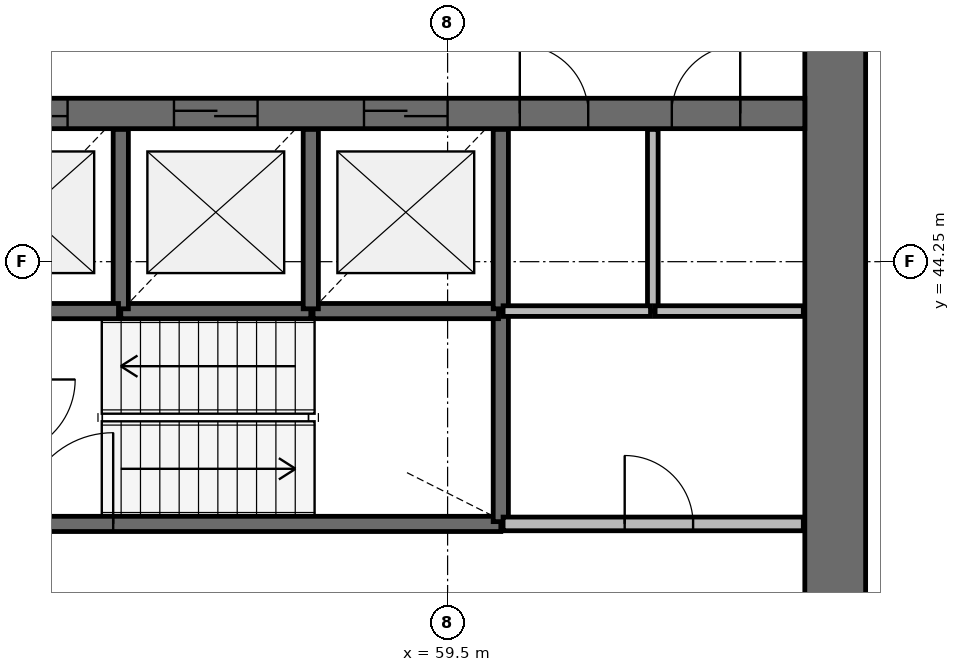
"""IFC4 building model, lengths in metres.
Left out: names, types, materials, properties, quantities, classifications, styles, units other than length and angle.
Written with IfcOpenShell. Run it as: python <this file> out.ifc"""

import sys

from ifc_helpers import new_model, si_unit, direction, frame, frame_2d, origin, place, context, subcontext, project, spatial, rectangle, extrude, source, transform, mapped, element, fill, save


model = new_model("IFC4")
c1 = context("Model", 3, precision=1e-05, world=origin(), true_north=direction((0.0, 1.0)))
c2 = subcontext(c1, "Body", "Model", "MODEL_VIEW")
j1 = project(units=[si_unit("LENGTHUNIT", "METRE"), si_unit("PLANEANGLEUNIT", "RADIAN")], contexts=[c1])
p1 = place(None, origin())
s1 = spatial("IfcSite", under=j1, at=p1, CompositionType="ELEMENT")
p2 = place(p1, origin())
s2 = spatial("IfcBuilding", under=s1, at=p2, CompositionType="ELEMENT")
p3 = place(p2, frame((0.0, 0.0, 133.1)))
s3 = spatial("IfcBuildingStorey", under=s2, at=p3, CompositionType="ELEMENT", Elevation=133.1)
p4 = place(p3, frame((64.6, 38.0, 0.0), z_axis=(0.0, 0.0, 1.0), x_axis=(0.0, 1.0, 0.0)))
e1 = element("IfcWall", 1, at=p4, inside=s3, PredefinedType="SHEAR", context=c2, shape_type="SweptSolid", body=[
    extrude(rectangle(XDim=20.0, YDim=0.8, at=frame_2d((10.0, 0.0))), origin(), (0.0, 0.0, 1.0), 3.9),
])
p5 = place(p4, frame((9.1, 0.0, 0.0)))
e2 = element("IfcOpeningElement", 2, at=p5, cuts=e1, PredefinedType="OPENING", context=c2, shape_type="SweptSolid", body=[
    extrude(rectangle(XDim=1.8, YDim=2.1, at=frame_2d((0.9, 1.05))), frame((0.0, 0.41, 0.0), z_axis=(0.0, -1.0, 0.0), x_axis=(1.0, 0.0, 0.0)), (0.0, 0.0, 1.0), 0.82),
])
p6 = place(p3, frame((39.8, 46.2, 0.0), z_axis=(0.0, 0.0, 1.0), x_axis=(1.0, 0.0, 0.0)))
e3 = element("IfcWall", 3, at=p6, inside=s3, PredefinedType="SHEAR", context=c2, shape_type="SweptSolid", body=[
    extrude(rectangle(XDim=24.4, YDim=0.4, at=frame_2d((12.2, 0.0))), origin(), (0.0, 0.0, 1.0), 3.9),
])
p7 = place(p6, frame((13.6, 0.0, 0.0)))
e4 = element("IfcOpeningElement", 4, at=p7, cuts=e3, PredefinedType="OPENING", context=c2, shape_type="SweptSolid", body=[
    extrude(rectangle(XDim=1.1, YDim=2.1, at=frame_2d((0.55, 1.05))), frame((0.0, 0.21, 0.0), z_axis=(0.0, -1.0, 0.0), x_axis=(1.0, 0.0, 0.0)), (0.0, 0.0, 1.0), 0.42),
])
p8 = place(p6, frame((16.1, 0.0, 0.0)))
e5 = element("IfcOpeningElement", 5, at=p8, cuts=e3, PredefinedType="OPENING", context=c2, shape_type="SweptSolid", body=[
    extrude(rectangle(XDim=1.1, YDim=2.1, at=frame_2d((0.55, 1.05))), frame((0.0, 0.21, 0.0), z_axis=(0.0, -1.0, 0.0), x_axis=(1.0, 0.0, 0.0)), (0.0, 0.0, 1.0), 0.42),
])
p9 = place(p6, frame((18.6, 0.0, 0.0)))
e6 = element("IfcOpeningElement", 6, at=p9, cuts=e3, PredefinedType="OPENING", context=c2, shape_type="SweptSolid", body=[
    extrude(rectangle(XDim=1.1, YDim=2.1, at=frame_2d((0.55, 1.05))), frame((0.0, 0.21, 0.0), z_axis=(0.0, -1.0, 0.0), x_axis=(1.0, 0.0, 0.0)), (0.0, 0.0, 1.0), 0.42),
])
p10 = place(p6, frame((4.7, 0.0, 0.0)))
e7 = element("IfcOpeningElement", 7, at=p10, cuts=e3, PredefinedType="OPENING", context=c2, shape_type="SweptSolid", body=[
    extrude(rectangle(XDim=1.1, YDim=2.1, at=frame_2d((0.55, 1.05))), frame((0.0, 0.21, 0.0), z_axis=(0.0, -1.0, 0.0), x_axis=(1.0, 0.0, 0.0)), (0.0, 0.0, 1.0), 0.42),
])
p11 = place(p6, frame((7.2, 0.0, 0.0)))
e8 = element("IfcOpeningElement", 8, at=p11, cuts=e3, PredefinedType="OPENING", context=c2, shape_type="SweptSolid", body=[
    extrude(rectangle(XDim=1.1, YDim=2.1, at=frame_2d((0.55, 1.05))), frame((0.0, 0.21, 0.0), z_axis=(0.0, -1.0, 0.0), x_axis=(1.0, 0.0, 0.0)), (0.0, 0.0, 1.0), 0.42),
])
p12 = place(p6, frame((9.7, 0.0, 0.0)))
e9 = element("IfcOpeningElement", 9, at=p12, cuts=e3, PredefinedType="OPENING", context=c2, shape_type="SweptSolid", body=[
    extrude(rectangle(XDim=1.1, YDim=2.1, at=frame_2d((0.55, 1.05))), frame((0.0, 0.21, 0.0), z_axis=(0.0, -1.0, 0.0), x_axis=(1.0, 0.0, 0.0)), (0.0, 0.0, 1.0), 0.42),
])
p13 = place(p6, frame((20.65, 0.0, 0.0)))
e10 = element("IfcOpeningElement", 10, at=p13, cuts=e3, PredefinedType="OPENING", context=c2, shape_type="SweptSolid", body=[
    extrude(rectangle(XDim=0.9, YDim=2.1, at=frame_2d((0.45, 1.05))), frame((0.0, 0.21, 0.0), z_axis=(0.0, -1.0, 0.0), x_axis=(1.0, 0.0, 0.0)), (0.0, 0.0, 1.0), 0.42),
])
p14 = place(p6, frame((22.65, 0.0, 0.0)))
e11 = element("IfcOpeningElement", 11, at=p14, cuts=e3, PredefinedType="OPENING", context=c2, shape_type="SweptSolid", body=[
    extrude(rectangle(XDim=0.9, YDim=2.1, at=frame_2d((0.45, 1.05))), frame((0.0, 0.21, 0.0), z_axis=(0.0, -1.0, 0.0), x_axis=(1.0, 0.0, 0.0)), (0.0, 0.0, 1.0), 0.42),
])
p15 = place(p6, frame((0.85, 0.0, 0.0)))
e12 = element("IfcOpeningElement", 12, at=p15, cuts=e3, PredefinedType="OPENING", context=c2, shape_type="SweptSolid", body=[
    extrude(rectangle(XDim=0.9, YDim=2.1, at=frame_2d((0.45, 1.05))), frame((0.0, 0.21, 0.0), z_axis=(0.0, -1.0, 0.0), x_axis=(1.0, 0.0, 0.0)), (0.0, 0.0, 1.0), 0.42),
])
p16 = place(p6, frame((2.85, 0.0, 0.0)))
e13 = element("IfcOpeningElement", 13, at=p16, cuts=e3, PredefinedType="OPENING", context=c2, shape_type="SweptSolid", body=[
    extrude(rectangle(XDim=0.9, YDim=2.1, at=frame_2d((0.45, 1.05))), frame((0.0, 0.21, 0.0), z_axis=(0.0, -1.0, 0.0), x_axis=(1.0, 0.0, 0.0)), (0.0, 0.0, 1.0), 0.42),
])
p17 = place(p6, frame((11.85, 0.0, 0.0)))
e14 = element("IfcOpeningElement", 14, at=p17, cuts=e3, PredefinedType="OPENING", context=c2, shape_type="SweptSolid", body=[
    extrude(rectangle(XDim=0.9, YDim=2.1, at=frame_2d((0.45, 1.05))), frame((0.0, 0.21, 0.0), z_axis=(0.0, -1.0, 0.0), x_axis=(1.0, 0.0, 0.0)), (0.0, 0.0, 1.0), 0.42),
])
p18 = place(p3, frame((53.6, 40.8, 0.0), z_axis=(0.0, 0.0, 1.0), x_axis=(1.0, 0.0, 0.0)))
e15 = element("IfcWall", 15, at=p18, inside=s3, PredefinedType="SOLIDWALL", context=c2, shape_type="SweptSolid", body=[
    extrude(rectangle(XDim=6.6, YDim=0.2, at=frame_2d((3.3, 0.0))), origin(), (0.0, 0.0, 1.0), 3.58),
])
p19 = place(p18, frame((0.3, 0.0, 0.0)))
e16 = element("IfcOpeningElement", 16, at=p19, cuts=e15, PredefinedType="OPENING", context=c2, shape_type="SweptSolid", body=[
    extrude(rectangle(XDim=1.2, YDim=2.1, at=frame_2d((0.6, 1.05))), frame((0.0, 0.11, 0.0), z_axis=(0.0, -1.0, 0.0), x_axis=(1.0, 0.0, 0.0)), (0.0, 0.0, 1.0), 0.22),
])
p20 = place(p3, frame((60.2, 40.83, 0.0), z_axis=(0.0, 0.0, 1.0), x_axis=(0.0, 1.0, 0.0)))
e17 = element("IfcWall", 17, at=p20, inside=s3, PredefinedType="SOLIDWALL", context=c2, shape_type="SweptSolid", body=[
    extrude(rectangle(XDim=2.77, YDim=0.2, at=frame_2d((1.385, 0.0))), origin(), (0.0, 0.0, 1.0), 3.58),
])
p21 = place(p3, frame((55.2, 43.6, 0.0), z_axis=(0.0, 0.0, 1.0), x_axis=(1.0, 0.0, 0.0)))
e18 = element("IfcWall", 18, at=p21, inside=s3, PredefinedType="SOLIDWALL", context=c2, shape_type="SweptSolid", body=[
    extrude(rectangle(XDim=2.5, YDim=0.2, at=frame_2d((1.25, 0.0))), origin(), (0.0, 0.0, 1.0), 3.58),
])
p22 = place(p3, frame((57.73, 43.6, 0.0), z_axis=(0.0, 0.0, 1.0), x_axis=(1.0, 0.0, 0.0)))
e19 = element("IfcWall", 19, at=p22, inside=s3, PredefinedType="SOLIDWALL", context=c2, shape_type="SweptSolid", body=[
    extrude(rectangle(XDim=2.44, YDim=0.2, at=frame_2d((1.22, 0.0))), origin(), (0.0, 0.0, 1.0), 3.58),
])
for number, where, z_axis, x_axis in (
    (20, (55.2, 43.63, 0.0), (0.0, 0.0, 1.0), (0.0, 1.0, 0.0)),
    (21, (57.7, 43.63, 0.0), (0.0, 0.0, 1.0), (0.0, 1.0, 0.0)),
    (22, (60.2, 43.63, 0.0), (0.0, 0.0, 1.0), (0.0, 1.0, 0.0)),
):
    element("IfcWall", number, at=place(p3, frame(where, z_axis=z_axis, x_axis=x_axis)), inside=s3, PredefinedType="SOLIDWALL", context=c2, shape_type="SweptSolid", body=[
        extrude(rectangle(XDim=2.36, YDim=0.2, at=frame_2d((1.18, 0.0))), origin(), (0.0, 0.0, 1.0), 3.58),
    ])
p23 = place(p3, frame((53.63, 43.6, 0.0), z_axis=(0.0, 0.0, 1.0), x_axis=(1.0, 0.0, 0.0)))
e23 = element("IfcWall", 23, at=p23, inside=s3, PredefinedType="SOLIDWALL", context=c2, shape_type="SweptSolid", body=[
    extrude(rectangle(XDim=1.54, YDim=0.2, at=frame_2d((0.77, 0.0))), origin(), (0.0, 0.0, 1.0), 3.58),
])
p24 = place(p3, frame((60.23, 40.8, 0.0), z_axis=(0.0, 0.0, 1.0), x_axis=(1.0, 0.0, 0.0)))
e24 = element("IfcWall", 24, at=p24, inside=s3, PredefinedType="PARTITIONING", context=c2, shape_type="SweptSolid", body=[
    extrude(rectangle(XDim=3.95, YDim=0.18, at=frame_2d((1.975, 0.0))), origin(), (0.0, 0.0, 1.0), 3.58),
])
p25 = place(p24, frame((1.6, 0.0, 0.0)))
e25 = element("IfcOpeningElement", 25, at=p25, cuts=e24, PredefinedType="OPENING", context=c2, shape_type="SweptSolid", body=[
    extrude(rectangle(XDim=0.9, YDim=2.1, at=frame_2d((0.45, 1.05))), frame((0.0, 0.1, 0.0), z_axis=(0.0, -1.0, 0.0), x_axis=(1.0, 0.0, 0.0)), (0.0, 0.0, 1.0), 0.2),
])
p26 = place(p3, frame((62.2, 43.6, 0.0), z_axis=(0.0, 0.0, 1.0), x_axis=(0.0, 1.0, 0.0)))
e26 = element("IfcWall", 26, at=p26, inside=s3, PredefinedType="PARTITIONING", context=c2, shape_type="SweptSolid", body=[
    extrude(rectangle(XDim=2.39, YDim=0.14, at=frame_2d((1.195, 0.0))), origin(), (0.0, 0.0, 1.0), 2.88),
])
p27 = place(p3, frame((60.23, 43.6, 0.0), z_axis=(0.0, 0.0, 1.0), x_axis=(1.0, 0.0, 0.0)))
e27 = element("IfcWall", 27, at=p27, inside=s3, PredefinedType="PARTITIONING", context=c2, shape_type="SweptSolid", body=[
    extrude(rectangle(XDim=1.94, YDim=0.14, at=frame_2d((0.97, 0.0))), origin(), (0.0, 0.0, 1.0), 2.88),
])
p28 = place(p3, frame((62.23, 43.6, 0.0), z_axis=(0.0, 0.0, 1.0), x_axis=(1.0, 0.0, 0.0)))
e28 = element("IfcWall", 28, at=p28, inside=s3, PredefinedType="PARTITIONING", context=c2, shape_type="SweptSolid", body=[
    extrude(rectangle(XDim=1.95, YDim=0.14, at=frame_2d((0.975, 0.0))), origin(), (0.0, 0.0, 1.0), 2.88),
])
m1 = source(origin(), c2, "Body", "SweptSolid", [
    extrude(rectangle(XDim=1.1, YDim=2.1, at=frame_2d((0.55, 1.05))), frame((0.0, 0.025, 0.0), z_axis=(0.0, -1.0, 0.0), x_axis=(1.0, 0.0, 0.0)), (0.0, 0.0, 1.0), 0.05),
])
p29 = place(p7, origin())
e29 = element("IfcDoor", 29, at=p29, inside=s3, OperationType="DOUBLE_DOOR_SLIDING", PredefinedType="USERDEFINED", context=c2, shape_type="MappedRepresentation", body=[
    mapped(m1, transform((0.0, 0.0, 0.0), scale=1.0)),
])
fill(e4, e29)
p30 = place(p8, origin())
e30 = element("IfcDoor", 30, at=p30, inside=s3, OperationType="DOUBLE_DOOR_SLIDING", PredefinedType="USERDEFINED", context=c2, shape_type="MappedRepresentation", body=[
    mapped(m1, transform((0.0, 0.0, 0.0), scale=1.0)),
])
fill(e5, e30)
p31 = place(p9, origin())
e31 = element("IfcDoor", 31, at=p31, inside=s3, OperationType="DOUBLE_DOOR_SLIDING", PredefinedType="USERDEFINED", context=c2, shape_type="MappedRepresentation", body=[
    mapped(m1, transform((0.0, 0.0, 0.0), scale=1.0)),
])
fill(e6, e31)
m2 = source(origin(), c2, "Body", "SweptSolid", [
    extrude(rectangle(XDim=1.2, YDim=2.1, at=frame_2d((0.6, 1.05))), frame((0.0, 0.025, 0.0), z_axis=(0.0, -1.0, 0.0), x_axis=(1.0, 0.0, 0.0)), (0.0, 0.0, 1.0), 0.05),
])
p32 = place(p19, origin())
e32 = element("IfcDoor", 32, at=p32, inside=s3, OperationType="SINGLE_SWING_RIGHT", PredefinedType="DOOR", context=c2, shape_type="MappedRepresentation", body=[
    mapped(m2, transform((0.0, 0.0, 0.0), scale=1.0)),
])
fill(e16, e32)
m3 = source(origin(), c2, "Body", "SweptSolid", [
    extrude(rectangle(XDim=0.9, YDim=2.1, at=frame_2d((0.45, 1.05))), frame((0.0, 0.025, 0.0), z_axis=(0.0, -1.0, 0.0), x_axis=(1.0, 0.0, 0.0)), (0.0, 0.0, 1.0), 0.05),
])
p33 = place(p13, origin())
e33 = element("IfcDoor", 33, at=p33, inside=s3, OperationType="SINGLE_SWING_LEFT", PredefinedType="DOOR", context=c2, shape_type="MappedRepresentation", body=[
    mapped(m3, transform((0.0, 0.0, 0.0), scale=1.0)),
])
fill(e10, e33)
p34 = place(p14, origin())
e34 = element("IfcDoor", 34, at=p34, inside=s3, OperationType="SINGLE_SWING_RIGHT", PredefinedType="DOOR", context=c2, shape_type="MappedRepresentation", body=[
    mapped(m3, transform((0.0, 0.0, 0.0), scale=1.0)),
])
fill(e11, e34)
p35 = place(p25, origin())
e35 = element("IfcDoor", 35, at=p35, inside=s3, OperationType="SINGLE_SWING_LEFT", PredefinedType="DOOR", context=c2, shape_type="MappedRepresentation", body=[
    mapped(m3, transform((0.0, 0.0, 0.0), scale=1.0)),
])
fill(e25, e35)
save(model, sys.argv[1])
